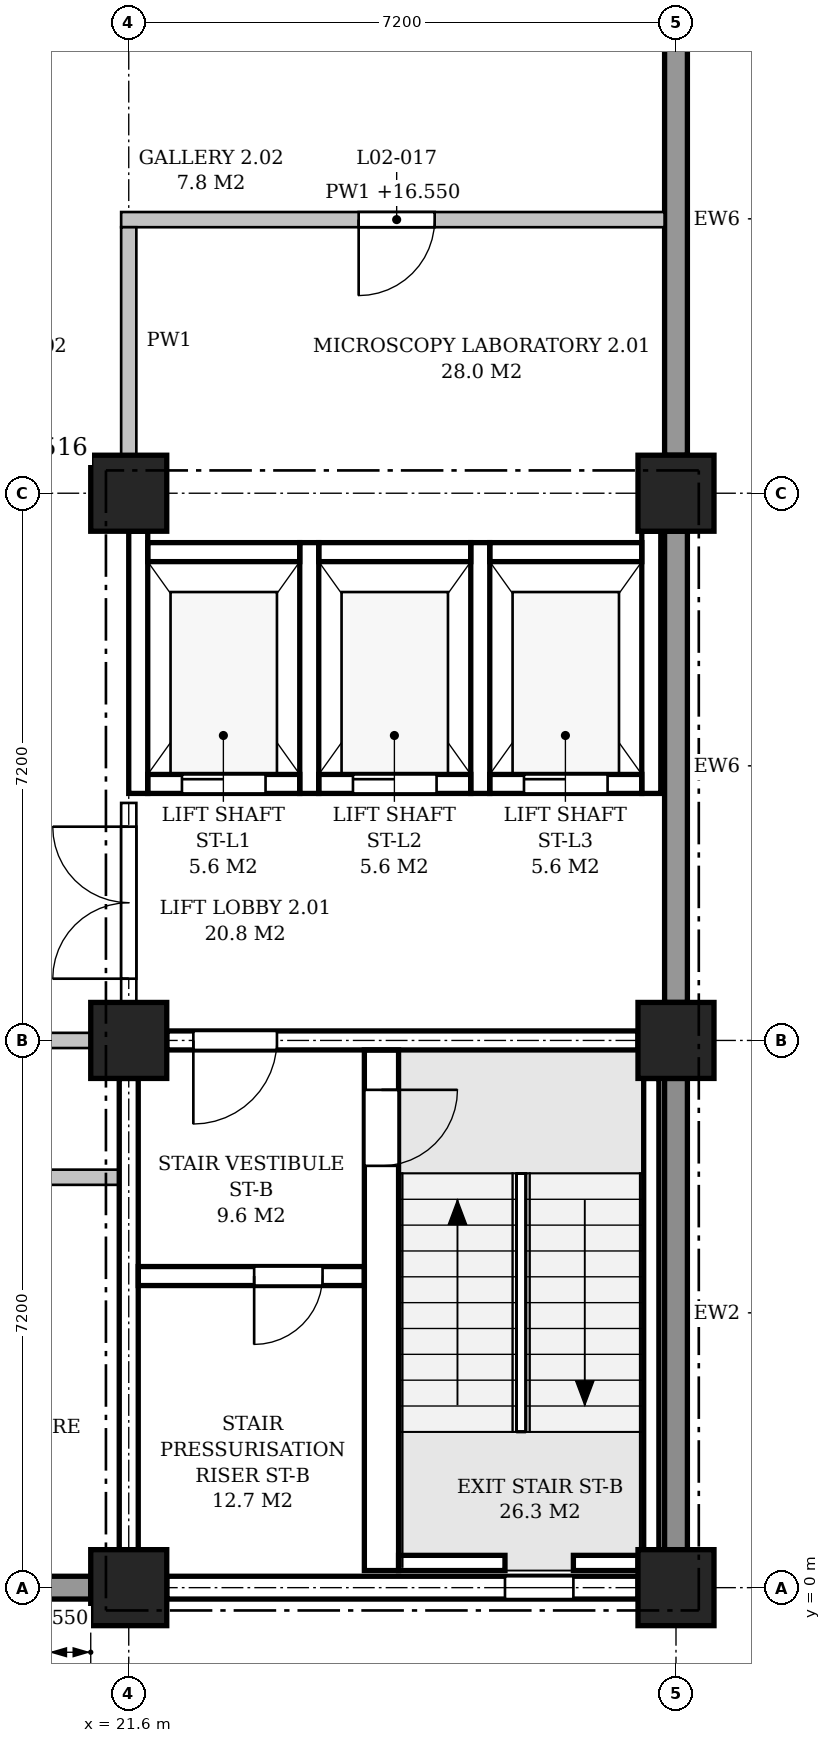
"""IFC4 building model, lengths in metres.
Left out: names, types, materials, properties, quantities, classifications, styles, units other than length and angle.
Written with IfcOpenShell. Run it as: python <this file> out.ifc"""

import sys

from ifc_helpers import new_model, si_unit, direction, frame, frame_2d, origin, origin_2d, place, context, subcontext, project, spatial, polyline, rectangle, outline, extrude, element, fill, save


model = new_model("IFC4")
c1 = context("Model", 3, precision=1e-05, world=origin(), true_north=direction((0.0, 1.0)))
c2 = subcontext(c1, "Body", "Model", "MODEL_VIEW")
j1 = project(units=[si_unit("LENGTHUNIT", "METRE"), si_unit("PLANEANGLEUNIT", "RADIAN")], contexts=[c1])
p1 = place(None, origin())
s1 = spatial("IfcSite", under=j1, at=p1, CompositionType="ELEMENT")
p2 = place(p1, origin())
s2 = spatial("IfcBuilding", under=s1, at=p2, CompositionType="ELEMENT")
p3 = place(p2, frame((0.0, 0.0, 11.4)))
s3 = spatial("IfcBuildingStorey", under=s2, at=p3, CompositionType="ELEMENT", Elevation=11.4)
for number, where, z_axis, x_axis in (
    (1, (21.6, 0.0, 0.0), (0.0, 0.0, 1.0), (1.0, 0.0, 0.0)),
    (2, (21.6, 7.2, 0.0), (0.0, 0.0, 1.0), (1.0, 0.0, 0.0)),
    (3, (21.6, 14.4, 0.0), (0.0, 0.0, 1.0), (1.0, 0.0, 0.0)),
    (4, (28.8, 0.0, 0.0), (0.0, 0.0, 1.0), (1.0, 0.0, 0.0)),
    (5, (28.8, 7.2, 0.0), (0.0, 0.0, 1.0), (1.0, 0.0, 0.0)),
    (6, (28.8, 14.4, 0.0), (0.0, 0.0, 1.0), (1.0, 0.0, 0.0)),
):
    element("IfcColumn", number, at=place(p3, frame(where, z_axis=z_axis, x_axis=x_axis)), inside=s3, PredefinedType="COLUMN", context=c2, shape_type="SweptSolid", body=[
        extrude(rectangle(XDim=1.0, YDim=1.0, at=origin_2d()), origin(), (0.0, 0.0, 1.0), 5.4),
    ])
p4 = place(p3, frame((14.9, 0.0, 0.0), z_axis=(0.0, 0.0, 1.0), x_axis=(1.0, 0.0, 0.0)))
e7 = element("IfcWall", 7, at=p4, inside=s3, PredefinedType="STANDARD", context=c2, shape_type="SweptSolid", body=[
    extrude(rectangle(XDim=6.2, YDim=0.3, at=frame_2d((3.1, 0.0))), origin(), (0.0, 0.0, 1.0), 4.55),
])
p5 = place(p4, frame((0.55, 0.0, 0.9)))
e8 = element("IfcOpeningElement", 8, at=p5, cuts=e7, PredefinedType="OPENING", context=c2, shape_type="SweptSolid", body=[
    extrude(outline(polyline([(0.0, 0.0), (1.5, 0.0), (1.5, 2.35), (0.75, 3.1), (0.0, 2.35), (0.0, 0.0)])), frame((0.0, 0.16, 0.0), z_axis=(0.0, -1.0, 0.0), x_axis=(1.0, 0.0, 0.0)), (0.0, 0.0, 1.0), 0.32),
])
p6 = place(p4, frame((4.15, 0.0, 0.9)))
e9 = element("IfcOpeningElement", 9, at=p6, cuts=e7, PredefinedType="OPENING", context=c2, shape_type="SweptSolid", body=[
    extrude(outline(polyline([(0.0, 0.0), (1.5, 0.0), (1.5, 2.35), (0.75, 3.1), (0.0, 2.35), (0.0, 0.0)])), frame((0.0, 0.16, 0.0), z_axis=(0.0, -1.0, 0.0), x_axis=(1.0, 0.0, 0.0)), (0.0, 0.0, 1.0), 0.32),
])
p7 = place(p3, frame((22.1, 0.0, 0.0), z_axis=(0.0, 0.0, 1.0), x_axis=(1.0, 0.0, 0.0)))
e10 = element("IfcWall", 10, at=p7, inside=s3, PredefinedType="STANDARD", context=c2, shape_type="SweptSolid", body=[
    extrude(rectangle(XDim=6.2, YDim=0.3, at=frame_2d((3.1, 0.0))), origin(), (0.0, 0.0, 1.0), 4.55),
])
p8 = place(p7, frame((4.45, 0.0, 0.9)))
e11 = element("IfcOpeningElement", 11, at=p8, cuts=e10, PredefinedType="OPENING", context=c2, shape_type="SweptSolid", body=[
    extrude(outline(polyline([(0.0, 0.0), (0.9, 0.0), (0.9, 2.65), (0.45, 3.1), (0.0, 2.65), (0.0, 0.0)])), frame((0.0, 0.16, 0.0), z_axis=(0.0, -1.0, 0.0), x_axis=(1.0, 0.0, 0.0)), (0.0, 0.0, 1.0), 0.32),
])
for number, where, z_axis, x_axis in (
    (12, (28.8, 0.5, 0.0), (0.0, 0.0, 1.0), (0.0, 1.0, 0.0)),
    (13, (28.8, 7.7, 0.0), (0.0, 0.0, 1.0), (0.0, 1.0, 0.0)),
):
    element("IfcWall", number, at=place(p3, frame(where, z_axis=z_axis, x_axis=x_axis)), inside=s3, PredefinedType="STANDARD", context=c2, shape_type="SweptSolid", body=[
        extrude(rectangle(XDim=6.2, YDim=0.3, at=frame_2d((3.1, 0.0))), origin(), (0.0, 0.0, 1.0), 4.55),
    ])
p9 = place(p3, frame((28.8, 14.9, 0.0), z_axis=(0.0, 0.0, 1.0), x_axis=(0.0, 1.0, 0.0)))
e14 = element("IfcWall", 14, at=p9, inside=s3, PredefinedType="STANDARD", context=c2, shape_type="SweptSolid", body=[
    extrude(rectangle(XDim=6.2, YDim=0.3, at=frame_2d((3.1, 0.0))), origin(), (0.0, 0.0, 1.0), 4.55),
])
p10 = place(p3, frame((22.1, 7.2, 0.0), z_axis=(0.0, 0.0, 1.0), x_axis=(1.0, 0.0, 0.0)))
e15 = element("IfcWall", 15, at=p10, inside=s3, PredefinedType="SHEAR", context=c2, shape_type="SweptSolid", body=[
    extrude(rectangle(XDim=6.2, YDim=0.25, at=frame_2d((3.1, 0.0))), origin(), (0.0, 0.0, 1.0), 4.4),
])
p11 = place(p10, frame((0.35, 0.0, 0.0)))
e16 = element("IfcOpeningElement", 16, at=p11, cuts=e15, PredefinedType="OPENING", context=c2, shape_type="SweptSolid", body=[
    extrude(rectangle(XDim=1.1, YDim=2.1, at=frame_2d((0.55, 1.05))), frame((0.0, 0.135, 0.0), z_axis=(0.0, -1.0, 0.0), x_axis=(1.0, 0.0, 0.0)), (0.0, 0.0, 1.0), 0.27),
])
p12 = place(p3, frame((21.6, 0.5, 0.0), z_axis=(0.0, 0.0, 1.0), x_axis=(0.0, 1.0, 0.0)))
e17 = element("IfcWall", 17, at=p12, inside=s3, PredefinedType="SHEAR", context=c2, shape_type="SweptSolid", body=[
    extrude(rectangle(XDim=6.2, YDim=0.25, at=frame_2d((3.1, 0.0))), origin(), (0.0, 0.0, 1.0), 4.4),
])
p13 = place(p3, frame((28.475, 0.5, -0.25), z_axis=(0.0, 0.0, 1.0), x_axis=(0.0, 1.0, 0.0)))
e18 = element("IfcWall", 18, at=p13, inside=s3, PredefinedType="SHEAR", context=c2, shape_type="SweptSolid", body=[
    extrude(rectangle(XDim=6.2, YDim=0.2, at=frame_2d((3.1, 0.0))), origin(), (0.0, 0.0, 1.0), 5.4),
])
p14 = place(p3, frame((25.15, 0.325, -0.25), z_axis=(0.0, 0.0, 1.0), x_axis=(1.0, 0.0, 0.0)))
e19 = element("IfcWall", 19, at=p14, inside=s3, PredefinedType="SHEAR", context=c2, shape_type="SweptSolid", body=[
    extrude(rectangle(XDim=1.4, YDim=0.2, at=frame_2d((0.7, 0.0))), origin(), (0.0, 0.0, 1.0), 5.4),
])
p15 = place(p3, frame((27.45, 0.325, -0.25), z_axis=(0.0, 0.0, 1.0), x_axis=(1.0, 0.0, 0.0)))
e20 = element("IfcWall", 20, at=p15, inside=s3, PredefinedType="SHEAR", context=c2, shape_type="SweptSolid", body=[
    extrude(rectangle(XDim=0.85, YDim=0.2, at=frame_2d((0.425, 0.0))), origin(), (0.0, 0.0, 1.0), 5.4),
])
p16 = place(p3, frame((24.925, 0.225, 0.0), z_axis=(0.0, 0.0, 1.0), x_axis=(0.0, 1.0, 0.0)))
e21 = element("IfcWall", 21, at=p16, inside=s3, PredefinedType="SHEAR", context=c2, shape_type="SweptSolid", body=[
    extrude(rectangle(XDim=6.85, YDim=0.45, at=frame_2d((3.425, 0.0))), origin(), (0.0, 0.0, 1.0), 5.15),
])
p17 = place(p16, frame((5.325, 0.0, 0.0)))
e22 = element("IfcOpeningElement", 22, at=p17, cuts=e21, PredefinedType="OPENING", context=c2, shape_type="SweptSolid", body=[
    extrude(rectangle(XDim=1.0, YDim=2.1, at=frame_2d((0.5, 1.05))), frame((0.0, 0.235, 0.0), z_axis=(0.0, -1.0, 0.0), x_axis=(1.0, 0.0, 0.0)), (0.0, 0.0, 1.0), 0.47),
])
p18 = place(p3, frame((21.725, 4.1, 0.0), z_axis=(0.0, 0.0, 1.0), x_axis=(1.0, 0.0, 0.0)))
e23 = element("IfcWall", 23, at=p18, inside=s3, PredefinedType="SHEAR", context=c2, shape_type="SweptSolid", body=[
    extrude(rectangle(XDim=2.975, YDim=0.25, at=frame_2d((1.487, 0.0))), origin(), (0.0, 0.0, 1.0), 5.15),
])
p19 = place(p18, frame((1.525, 0.0, 0.0)))
e24 = element("IfcOpeningElement", 24, at=p19, cuts=e23, PredefinedType="OPENING", context=c2, shape_type="SweptSolid", body=[
    extrude(rectangle(XDim=0.9, YDim=2.1, at=frame_2d((0.45, 1.05))), frame((0.0, 0.135, 0.0), z_axis=(0.0, -1.0, 0.0), x_axis=(1.0, 0.0, 0.0)), (0.0, 0.0, 1.0), 0.27),
])
p20 = place(p3, frame((21.725, 10.45, -0.25), z_axis=(0.0, 0.0, 1.0), x_axis=(0.0, 1.0, 0.0)))
e25 = element("IfcWall", 25, at=p20, inside=s3, PredefinedType="SHEAR", context=c2, shape_type="SweptSolid", body=[
    extrude(rectangle(XDim=3.45, YDim=0.25, at=frame_2d((1.725, 0.0))), origin(), (0.0, 0.0, 1.0), 4.65),
])
for number, where, z_axis, x_axis in (
    (26, (23.975, 10.45, -0.25), (0.0, 0.0, 1.0), (0.0, 1.0, 0.0)),
    (27, (26.225, 10.45, -0.25), (0.0, 0.0, 1.0), (0.0, 1.0, 0.0)),
):
    element("IfcWall", number, at=place(p3, frame(where, z_axis=z_axis, x_axis=x_axis)), inside=s3, PredefinedType="SHEAR", context=c2, shape_type="SweptSolid", body=[
        extrude(rectangle(XDim=3.3, YDim=0.25, at=frame_2d((1.65, 0.0))), origin(), (0.0, 0.0, 1.0), 5.4),
    ])
p21 = place(p3, frame((28.475, 10.45, -0.25), z_axis=(0.0, 0.0, 1.0), x_axis=(0.0, 1.0, 0.0)))
e28 = element("IfcWall", 28, at=p21, inside=s3, PredefinedType="SHEAR", context=c2, shape_type="SweptSolid", body=[
    extrude(rectangle(XDim=3.45, YDim=0.25, at=frame_2d((1.725, 0.0))), origin(), (0.0, 0.0, 1.0), 5.4),
])
p22 = place(p3, frame((21.85, 10.575, -0.25), z_axis=(0.0, 0.0, 1.0), x_axis=(1.0, 0.0, 0.0)))
e29 = element("IfcWall", 29, at=p22, inside=s3, PredefinedType="SHEAR", context=c2, shape_type="SweptSolid", body=[
    extrude(rectangle(XDim=2.0, YDim=0.25, at=frame_2d((1.0, 0.0))), origin(), (0.0, 0.0, 1.0), 5.4),
])
p23 = place(p22, frame((0.45, 0.0, 0.25)))
e30 = element("IfcOpeningElement", 30, at=p23, cuts=e29, PredefinedType="OPENING", context=c2, shape_type="SweptSolid", body=[
    extrude(rectangle(XDim=1.1, YDim=2.1, at=frame_2d((0.55, 1.05))), frame((0.0, 0.135, 0.0), z_axis=(0.0, -1.0, 0.0), x_axis=(1.0, 0.0, 0.0)), (0.0, 0.0, 1.0), 0.27),
])
p24 = place(p3, frame((21.85, 13.625, -0.25), z_axis=(0.0, 0.0, 1.0), x_axis=(1.0, 0.0, 0.0)))
e31 = element("IfcWall", 31, at=p24, inside=s3, PredefinedType="SHEAR", context=c2, shape_type="SweptSolid", body=[
    extrude(rectangle(XDim=2.0, YDim=0.25, at=frame_2d((1.0, 0.0))), origin(), (0.0, 0.0, 1.0), 5.4),
])
p25 = place(p3, frame((24.1, 10.575, -0.25), z_axis=(0.0, 0.0, 1.0), x_axis=(1.0, 0.0, 0.0)))
e32 = element("IfcWall", 32, at=p25, inside=s3, PredefinedType="SHEAR", context=c2, shape_type="SweptSolid", body=[
    extrude(rectangle(XDim=2.0, YDim=0.25, at=frame_2d((1.0, 0.0))), origin(), (0.0, 0.0, 1.0), 5.4),
])
p26 = place(p25, frame((0.45, 0.0, 0.25)))
e33 = element("IfcOpeningElement", 33, at=p26, cuts=e32, PredefinedType="OPENING", context=c2, shape_type="SweptSolid", body=[
    extrude(rectangle(XDim=1.1, YDim=2.1, at=frame_2d((0.55, 1.05))), frame((0.0, 0.135, 0.0), z_axis=(0.0, -1.0, 0.0), x_axis=(1.0, 0.0, 0.0)), (0.0, 0.0, 1.0), 0.27),
])
p27 = place(p3, frame((24.1, 13.625, -0.25), z_axis=(0.0, 0.0, 1.0), x_axis=(1.0, 0.0, 0.0)))
e34 = element("IfcWall", 34, at=p27, inside=s3, PredefinedType="SHEAR", context=c2, shape_type="SweptSolid", body=[
    extrude(rectangle(XDim=2.0, YDim=0.25, at=frame_2d((1.0, 0.0))), origin(), (0.0, 0.0, 1.0), 5.4),
])
p28 = place(p3, frame((26.35, 10.575, -0.25), z_axis=(0.0, 0.0, 1.0), x_axis=(1.0, 0.0, 0.0)))
e35 = element("IfcWall", 35, at=p28, inside=s3, PredefinedType="SHEAR", context=c2, shape_type="SweptSolid", body=[
    extrude(rectangle(XDim=2.0, YDim=0.25, at=frame_2d((1.0, 0.0))), origin(), (0.0, 0.0, 1.0), 5.4),
])
p29 = place(p28, frame((0.45, 0.0, 0.25)))
e36 = element("IfcOpeningElement", 36, at=p29, cuts=e35, PredefinedType="OPENING", context=c2, shape_type="SweptSolid", body=[
    extrude(rectangle(XDim=1.1, YDim=2.1, at=frame_2d((0.55, 1.05))), frame((0.0, 0.135, 0.0), z_axis=(0.0, -1.0, 0.0), x_axis=(1.0, 0.0, 0.0)), (0.0, 0.0, 1.0), 0.27),
])
p30 = place(p3, frame((26.35, 13.625, -0.25), z_axis=(0.0, 0.0, 1.0), x_axis=(1.0, 0.0, 0.0)))
e37 = element("IfcWall", 37, at=p30, inside=s3, PredefinedType="SHEAR", context=c2, shape_type="SweptSolid", body=[
    extrude(rectangle(XDim=2.0, YDim=0.25, at=frame_2d((1.0, 0.0))), origin(), (0.0, 0.0, 1.0), 5.4),
])
p31 = place(p3, frame((7.325, 5.4, 0.0), z_axis=(0.0, 0.0, 1.0), x_axis=(1.0, 0.0, 0.0)))
e38 = element("IfcWall", 38, at=p31, inside=s3, PredefinedType="PARTITIONING", context=c2, shape_type="SweptSolid", body=[
    extrude(outline(polyline([(0.0, 0.0), (14.15, 0.0), (14.15, 4.4), (14.025, 4.4), (14.025, 5.15), (7.325, 5.15), (7.325, 4.4), (6.825, 4.4), (6.825, 5.15), (0.125, 5.15), (0.125, 4.4), (0.0, 4.4), (0.0, 0.0)])), frame((0.0, 0.1, 0.0), z_axis=(0.0, -1.0, 0.0), x_axis=(1.0, 0.0, 0.0)), (0.0, 0.0, 1.0), 0.2),
])
p32 = place(p31, frame((1.238, 0.0, 0.0)))
e39 = element("IfcOpeningElement", 39, at=p32, cuts=e38, PredefinedType="OPENING", context=c2, shape_type="SweptSolid", body=[
    extrude(rectangle(XDim=1.0, YDim=2.1, at=frame_2d((0.5, 1.05))), frame((0.0, 0.11, 0.0), z_axis=(0.0, -1.0, 0.0), x_axis=(1.0, 0.0, 0.0)), (0.0, 0.0, 1.0), 0.22),
])
p33 = place(p31, frame((4.775, 0.0, 0.0)))
e40 = element("IfcOpeningElement", 40, at=p33, cuts=e38, PredefinedType="OPENING", context=c2, shape_type="SweptSolid", body=[
    extrude(rectangle(XDim=1.0, YDim=2.1, at=frame_2d((0.5, 1.05))), frame((0.0, 0.11, 0.0), z_axis=(0.0, -1.0, 0.0), x_axis=(1.0, 0.0, 0.0)), (0.0, 0.0, 1.0), 0.22),
])
p34 = place(p31, frame((8.375, 0.0, 0.0)))
e41 = element("IfcOpeningElement", 41, at=p34, cuts=e38, PredefinedType="OPENING", context=c2, shape_type="SweptSolid", body=[
    extrude(rectangle(XDim=1.0, YDim=2.1, at=frame_2d((0.5, 1.05))), frame((0.0, 0.11, 0.0), z_axis=(0.0, -1.0, 0.0), x_axis=(1.0, 0.0, 0.0)), (0.0, 0.0, 1.0), 0.22),
])
p35 = place(p31, frame((11.913, 0.0, 0.0)))
e42 = element("IfcOpeningElement", 42, at=p35, cuts=e38, PredefinedType="OPENING", context=c2, shape_type="SweptSolid", body=[
    extrude(rectangle(XDim=1.0, YDim=2.1, at=frame_2d((0.5, 1.05))), frame((0.0, 0.11, 0.0), z_axis=(0.0, -1.0, 0.0), x_axis=(1.0, 0.0, 0.0)), (0.0, 0.0, 1.0), 0.22),
])
p36 = place(p3, frame((14.9, 7.2, 0.0), z_axis=(0.0, 0.0, 1.0), x_axis=(1.0, 0.0, 0.0)))
e43 = element("IfcWall", 43, at=p36, inside=s3, PredefinedType="PARTITIONING", context=c2, shape_type="SweptSolid", body=[
    extrude(rectangle(XDim=6.2, YDim=0.2, at=frame_2d((3.1, 0.0))), origin(), (0.0, 0.0, 1.0), 4.4),
])
p37 = place(p36, frame((4.15, 0.0, 0.0)))
e44 = element("IfcOpeningElement", 44, at=p37, cuts=e43, PredefinedType="OPENING", context=c2, shape_type="SweptSolid", body=[
    extrude(rectangle(XDim=1.0, YDim=2.1, at=frame_2d((0.5, 1.05))), frame((0.0, 0.11, 0.0), z_axis=(0.0, -1.0, 0.0), x_axis=(1.0, 0.0, 0.0)), (0.0, 0.0, 1.0), 0.22),
])
p38 = place(p3, frame((21.5, 18.0, 0.0), z_axis=(0.0, 0.0, 1.0), x_axis=(1.0, 0.0, 0.0)))
e45 = element("IfcWall", 45, at=p38, inside=s3, PredefinedType="PARTITIONING", context=c2, shape_type="SweptSolid", body=[
    extrude(outline(polyline([(0.0, 0.0), (7.15, 0.0), (7.15, 4.55), (7.05, 4.55), (7.05, 5.15), (0.35, 5.15), (0.35, 4.4), (0.0, 4.4), (0.0, 0.0)])), frame((0.0, 0.1, 0.0), z_axis=(0.0, -1.0, 0.0), x_axis=(1.0, 0.0, 0.0)), (0.0, 0.0, 1.0), 0.2),
])
p39 = place(p38, frame((3.125, 0.0, 0.0)))
e46 = element("IfcOpeningElement", 46, at=p39, cuts=e45, PredefinedType="OPENING", context=c2, shape_type="SweptSolid", body=[
    extrude(rectangle(XDim=1.0, YDim=2.1, at=frame_2d((0.5, 1.05))), frame((0.0, 0.11, 0.0), z_axis=(0.0, -1.0, 0.0), x_axis=(1.0, 0.0, 0.0)), (0.0, 0.0, 1.0), 0.22),
])
p40 = place(p3, frame((21.6, 7.7, 0.0), z_axis=(0.0, 0.0, 1.0), x_axis=(0.0, 1.0, 0.0)))
e47 = element("IfcWall", 47, at=p40, inside=s3, PredefinedType="PARTITIONING", context=c2, shape_type="SweptSolid", body=[
    extrude(rectangle(XDim=2.625, YDim=0.2, at=frame_2d((1.312, 0.0))), origin(), (0.0, 0.0, 1.0), 4.4),
])
p41 = place(p40, frame((0.312, 0.0, 0.0)))
e48 = element("IfcOpeningElement", 48, at=p41, cuts=e47, PredefinedType="OPENING", context=c2, shape_type="SweptSolid", body=[
    extrude(rectangle(XDim=2.0, YDim=2.4, at=frame_2d((1.0, 1.2))), frame((0.0, 0.11, 0.0), z_axis=(0.0, -1.0, 0.0), x_axis=(1.0, 0.0, 0.0)), (0.0, 0.0, 1.0), 0.22),
])
p42 = place(p3, frame((21.6, 14.9, 0.0), z_axis=(0.0, 0.0, 1.0), x_axis=(0.0, 1.0, 0.0)))
e49 = element("IfcWall", 49, at=p42, inside=s3, PredefinedType="PARTITIONING", context=c2, shape_type="SweptSolid", body=[
    extrude(rectangle(XDim=3.0, YDim=0.2, at=frame_2d((1.5, 0.0))), origin(), (0.0, 0.0, 1.0), 4.4),
])
p43 = place(p8, origin())
e50 = element("IfcWindow", 50, at=p43, inside=s3, PartitioningType="SINGLE_PANEL", PredefinedType="WINDOW", context=c2, shape_type="SweptSolid", body=[
    extrude(outline(polyline([(0.0, 0.0), (0.9, 0.0), (0.9, 2.65), (0.45, 3.1), (0.0, 2.65), (0.0, 0.0)])), frame((0.0, 0.03, 0.0), z_axis=(0.0, -1.0, 0.0), x_axis=(1.0, 0.0, 0.0)), (0.0, 0.0, 1.0), 0.06),
])
fill(e11, e50)
p44 = place(p17, frame((1.0, 0.0, 0.0), z_axis=(0.0, 0.0, 1.0), x_axis=(-1.0, 0.0, 0.0)))
e51 = element("IfcDoor", 51, at=p44, inside=s3, OperationType="SINGLE_SWING_LEFT", PredefinedType="DOOR", context=c2, shape_type="SweptSolid", body=[
    extrude(rectangle(XDim=1.0, YDim=2.1, at=frame_2d((0.5, 1.05))), frame((0.0, 0.025, 0.0), z_axis=(0.0, -1.0, 0.0), x_axis=(1.0, 0.0, 0.0)), (0.0, 0.0, 1.0), 0.05),
])
fill(e22, e51)
p45 = place(p11, frame((1.1, 0.0, 0.0), z_axis=(0.0, 0.0, 1.0), x_axis=(-1.0, 0.0, 0.0)))
e52 = element("IfcDoor", 52, at=p45, inside=s3, OperationType="SINGLE_SWING_RIGHT", PredefinedType="DOOR", context=c2, shape_type="SweptSolid", body=[
    extrude(rectangle(XDim=1.1, YDim=2.1, at=frame_2d((0.55, 1.05))), frame((0.0, 0.025, 0.0), z_axis=(0.0, -1.0, 0.0), x_axis=(1.0, 0.0, 0.0)), (0.0, 0.0, 1.0), 0.05),
])
fill(e16, e52)
p46 = place(p19, frame((0.9, 0.0, 0.0), z_axis=(0.0, 0.0, 1.0), x_axis=(-1.0, 0.0, 0.0)))
e53 = element("IfcDoor", 53, at=p46, inside=s3, OperationType="SINGLE_SWING_RIGHT", PredefinedType="DOOR", context=c2, shape_type="SweptSolid", body=[
    extrude(rectangle(XDim=0.9, YDim=2.1, at=frame_2d((0.45, 1.05))), frame((0.0, 0.025, 0.0), z_axis=(0.0, -1.0, 0.0), x_axis=(1.0, 0.0, 0.0)), (0.0, 0.0, 1.0), 0.05),
])
fill(e24, e53)
p47 = place(p23, origin())
e54 = element("IfcDoor", 54, at=p47, inside=s3, OperationType="SLIDING_TO_LEFT", PredefinedType="DOOR", context=c2, shape_type="SweptSolid", body=[
    extrude(rectangle(XDim=1.1, YDim=2.1, at=frame_2d((0.55, 1.05))), frame((0.0, 0.025, 0.0), z_axis=(0.0, -1.0, 0.0), x_axis=(1.0, 0.0, 0.0)), (0.0, 0.0, 1.0), 0.05),
])
fill(e30, e54)
p48 = place(p26, origin())
e55 = element("IfcDoor", 55, at=p48, inside=s3, OperationType="SLIDING_TO_LEFT", PredefinedType="DOOR", context=c2, shape_type="SweptSolid", body=[
    extrude(rectangle(XDim=1.1, YDim=2.1, at=frame_2d((0.55, 1.05))), frame((0.0, 0.025, 0.0), z_axis=(0.0, -1.0, 0.0), x_axis=(1.0, 0.0, 0.0)), (0.0, 0.0, 1.0), 0.05),
])
fill(e33, e55)
p49 = place(p29, origin())
e56 = element("IfcDoor", 56, at=p49, inside=s3, OperationType="SLIDING_TO_LEFT", PredefinedType="DOOR", context=c2, shape_type="SweptSolid", body=[
    extrude(rectangle(XDim=1.1, YDim=2.1, at=frame_2d((0.55, 1.05))), frame((0.0, 0.025, 0.0), z_axis=(0.0, -1.0, 0.0), x_axis=(1.0, 0.0, 0.0)), (0.0, 0.0, 1.0), 0.05),
])
fill(e36, e56)
p50 = place(p41, origin())
e57 = element("IfcDoor", 57, at=p50, inside=s3, OperationType="DOUBLE_DOOR_SINGLE_SWING", PredefinedType="DOOR", context=c2, shape_type="SweptSolid", body=[
    extrude(rectangle(XDim=2.0, YDim=2.4, at=frame_2d((1.0, 1.2))), frame((0.0, 0.025, 0.0), z_axis=(0.0, -1.0, 0.0), x_axis=(1.0, 0.0, 0.0)), (0.0, 0.0, 1.0), 0.05),
])
fill(e48, e57)
p51 = place(p39, frame((1.0, 0.0, 0.0), z_axis=(0.0, 0.0, 1.0), x_axis=(-1.0, 0.0, 0.0)))
e58 = element("IfcDoor", 58, at=p51, inside=s3, OperationType="SINGLE_SWING_RIGHT", PredefinedType="DOOR", context=c2, shape_type="SweptSolid", body=[
    extrude(rectangle(XDim=1.0, YDim=2.1, at=frame_2d((0.5, 1.05))), frame((0.0, 0.025, 0.0), z_axis=(0.0, -1.0, 0.0), x_axis=(1.0, 0.0, 0.0)), (0.0, 0.0, 1.0), 0.05),
])
fill(e46, e58)
save(model, sys.argv[1])
